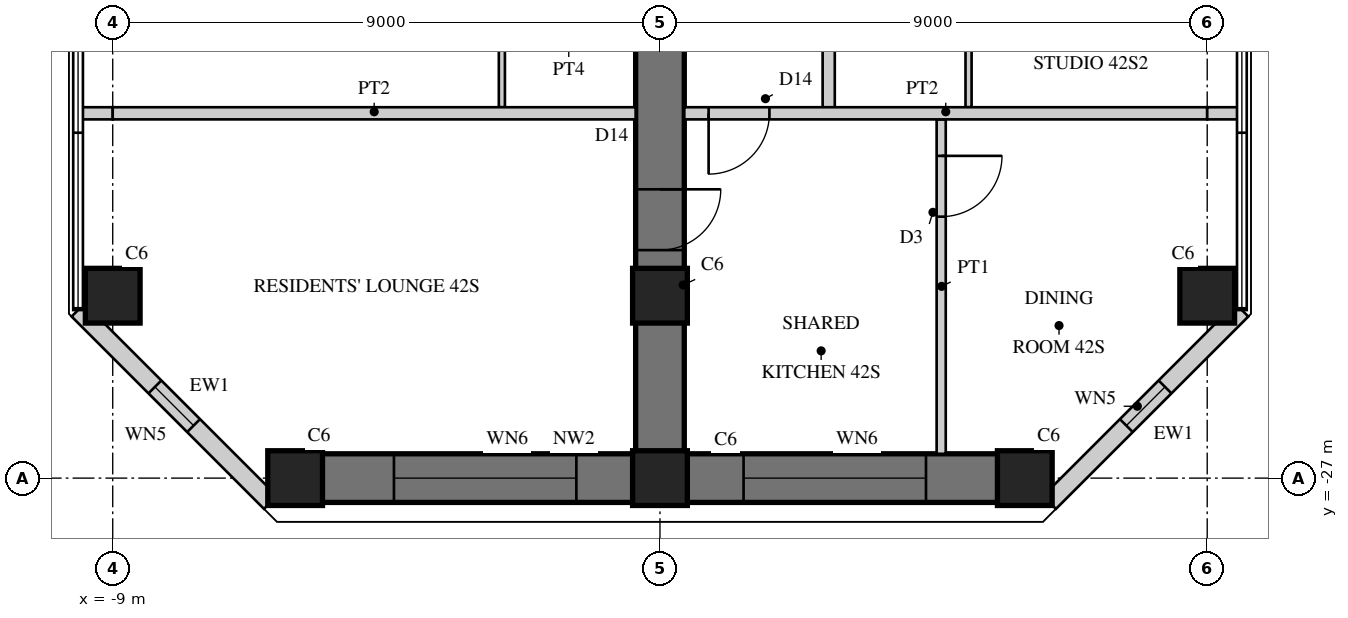
"""IFC4 building model, lengths in metres.
Left out: names, types, materials, properties, quantities, classifications, styles, units other than length and angle.
Written with IfcOpenShell. Run it as: python <this file> out.ifc"""

import sys

from ifc_helpers import new_model, si_unit, direction, frame, frame_2d, origin, origin_2d, place, context, subcontext, project, spatial, rectangle, hollow_rectangle, extrude, element, fill, save


model = new_model("IFC4")
c1 = context("Model", 3, precision=1e-05, world=origin(), true_north=direction((0.0, 1.0)))
c2 = subcontext(c1, "Body", "Model", "MODEL_VIEW")
j1 = project(units=[si_unit("LENGTHUNIT", "METRE"), si_unit("PLANEANGLEUNIT", "RADIAN")], contexts=[c1])
p1 = place(None, origin())
s1 = spatial("IfcSite", under=j1, at=p1, CompositionType="ELEMENT")
p2 = place(p1, origin())
s2 = spatial("IfcBuilding", under=s1, at=p2, CompositionType="ELEMENT")
p3 = place(p2, frame((0.0, 0.0, 172.9)))
s3 = spatial("IfcBuildingStorey", under=s2, at=p3, CompositionType="ELEMENT", Elevation=172.9)
p4 = place(p3, frame((0.0, -9.0, 0.0), z_axis=(0.0, 0.0, 1.0), x_axis=(0.0, -1.0, 0.0)))
e1 = element("IfcWall", 1, at=p4, inside=s3, PredefinedType="SHEAR", context=c2, shape_type="SweptSolid", body=[
    extrude(rectangle(XDim=18.0, YDim=0.8, at=frame_2d((9.0, 0.0))), origin(), (0.0, 0.0, 1.0), 3.4),
])
p5 = place(p4, frame((3.95, 0.0, 0.0)))
e2 = element("IfcOpeningElement", 2, at=p5, cuts=e1, PredefinedType="OPENING", context=c2, shape_type="SweptSolid", body=[
    extrude(rectangle(XDim=1.0, YDim=2.15, at=frame_2d((0.5, 1.075))), frame((0.0, 0.41, 0.0), z_axis=(0.0, -1.0, 0.0), x_axis=(1.0, 0.0, 0.0)), (0.0, 0.0, 1.0), 0.82),
])
p6 = place(p4, frame((6.6, 0.0, 0.0)))
e3 = element("IfcOpeningElement", 3, at=p6, cuts=e1, PredefinedType="OPENING", context=c2, shape_type="SweptSolid", body=[
    extrude(rectangle(XDim=1.0, YDim=2.15, at=frame_2d((0.5, 1.075))), frame((0.0, 0.41, 0.0), z_axis=(0.0, -1.0, 0.0), x_axis=(1.0, 0.0, 0.0)), (0.0, 0.0, 1.0), 0.82),
])
p7 = place(p4, frame((13.25, 0.0, 0.0)))
e4 = element("IfcOpeningElement", 4, at=p7, cuts=e1, PredefinedType="OPENING", context=c2, shape_type="SweptSolid", body=[
    extrude(rectangle(XDim=1.0, YDim=2.2, at=frame_2d((0.5, 1.1))), frame((0.0, 0.41, 0.0), z_axis=(0.0, -1.0, 0.0), x_axis=(1.0, 0.0, 0.0)), (0.0, 0.0, 1.0), 0.82),
])
p8 = place(p3, frame((-6.0, -27.0, 0.0), z_axis=(0.0, 0.0, 1.0), x_axis=(1.0, 0.0, 0.0)))
e5 = element("IfcWall", 5, at=p8, inside=s3, PredefinedType="SHEAR", context=c2, shape_type="SweptSolid", body=[
    extrude(rectangle(XDim=12.0, YDim=0.8, at=frame_2d((6.0, 0.0))), origin(), (0.0, 0.0, 1.0), 3.4),
])
p9 = place(p8, frame((1.625, 0.0, 0.6)))
e6 = element("IfcOpeningElement", 6, at=p9, cuts=e5, PredefinedType="OPENING", context=c2, shape_type="SweptSolid", body=[
    extrude(rectangle(XDim=3.0, YDim=2.4, at=frame_2d((1.5, 1.2))), frame((0.0, 0.41, 0.0), z_axis=(0.0, -1.0, 0.0), x_axis=(1.0, 0.0, 0.0)), (0.0, 0.0, 1.0), 0.82),
])
p10 = place(p8, frame((7.375, 0.0, 0.6)))
e7 = element("IfcOpeningElement", 7, at=p10, cuts=e5, PredefinedType="OPENING", context=c2, shape_type="SweptSolid", body=[
    extrude(rectangle(XDim=3.0, YDim=2.4, at=frame_2d((1.5, 1.2))), frame((0.0, 0.41, 0.0), z_axis=(0.0, -1.0, 0.0), x_axis=(1.0, 0.0, 0.0)), (0.0, 0.0, 1.0), 0.82),
])
for number, where, z_axis, x_axis in (
    (8, (-9.0, -24.0, 0.0), (0.0, 0.0, 1.0), (1.0, 0.0, 0.0)),
    (9, (9.0, -24.0, 0.0), (0.0, 0.0, 1.0), (1.0, 0.0, 0.0)),
    (10, (-6.0, -27.0, 0.0), (0.0, 0.0, 1.0), (1.0, 0.0, 0.0)),
    (11, (0.0, -27.0, 0.0), (0.0, 0.0, 1.0), (1.0, 0.0, 0.0)),
    (12, (6.0, -27.0, 0.0), (0.0, 0.0, 1.0), (1.0, 0.0, 0.0)),
    (13, (0.0, -24.0, 0.0), (0.0, 0.0, 1.0), (1.0, 0.0, 0.0)),
):
    element("IfcColumn", number, at=place(p3, frame(where, z_axis=z_axis, x_axis=x_axis)), inside=s3, PredefinedType="COLUMN", context=c2, shape_type="SweptSolid", body=[
        extrude(rectangle(XDim=0.9, YDim=0.9, at=origin_2d()), origin(), (0.0, 0.0, 1.0), 3.4),
    ])
p11 = place(p3, frame((-9.57, -24.236, 0.0), z_axis=(0.0, 0.0, 1.0), x_axis=(0.707134062067, -0.707079499254, 0.0)))
e14 = element("IfcWall", 14, at=p11, inside=s3, PredefinedType="SOLIDWALL", context=c2, shape_type="SweptSolid", body=[
    extrude(rectangle(XDim=4.475, YDim=0.3, at=frame_2d((2.237, 0.0))), origin(), (0.0, 0.0, 1.0), 3.22),
])
p12 = place(p11, frame((1.787, 0.0, 0.3)))
e15 = element("IfcOpeningElement", 15, at=p12, cuts=e14, PredefinedType="OPENING", context=c2, shape_type="SweptSolid", body=[
    extrude(rectangle(XDim=0.9, YDim=2.4, at=frame_2d((0.45, 1.2))), frame((0.0, 0.16, 0.0), z_axis=(0.0, -1.0, 0.0), x_axis=(1.0, 0.0, 0.0)), (0.0, 0.0, 1.0), 0.32),
])
p13 = place(p3, frame((6.406, -27.4, 0.0), z_axis=(0.0, 0.0, 1.0), x_axis=(0.707134062067, 0.707079499254, 0.0)))
e16 = element("IfcWall", 16, at=p13, inside=s3, PredefinedType="SOLIDWALL", context=c2, shape_type="SweptSolid", body=[
    extrude(rectangle(XDim=4.475, YDim=0.3, at=frame_2d((2.237, 0.0))), origin(), (0.0, 0.0, 1.0), 3.22),
])
p14 = place(p13, frame((1.787, 0.0, 0.3)))
e17 = element("IfcOpeningElement", 17, at=p14, cuts=e16, PredefinedType="OPENING", context=c2, shape_type="SweptSolid", body=[
    extrude(rectangle(XDim=0.9, YDim=2.4, at=frame_2d((0.45, 1.2))), frame((0.0, 0.16, 0.0), z_axis=(0.0, -1.0, 0.0), x_axis=(1.0, 0.0, 0.0)), (0.0, 0.0, 1.0), 0.32),
])
for number, where, z_axis, x_axis in (
    (18, (5.075, -18.45, 0.0), (0.0, 0.0, 1.0), (0.0, -1.0, 0.0)),
    (19, (-2.6, -18.45, 0.0), (0.0, 0.0, 1.0), (0.0, -1.0, 0.0)),
):
    element("IfcWall", number, at=place(p3, frame(where, z_axis=z_axis, x_axis=x_axis)), inside=s3, PredefinedType="PARTITIONING", context=c2, shape_type="SweptSolid", body=[
        extrude(rectangle(XDim=2.45, YDim=0.1, at=frame_2d((1.225, 0.0))), origin(), (0.0, 0.0, 1.0), 3.22),
    ])
p15 = place(p3, frame((2.775, -9.55, 0.0), z_axis=(0.0, 0.0, 1.0), x_axis=(0.0, -1.0, 0.0)))
e20 = element("IfcWall", 20, at=p15, inside=s3, PredefinedType="SOLIDWALL", context=c2, shape_type="SweptSolid", body=[
    extrude(rectangle(XDim=11.45, YDim=0.2, at=frame_2d((5.725, 0.0))), origin(), (0.0, 0.0, 1.0), 3.22),
])
p16 = place(p15, frame((3.4, 0.0, 0.0)))
e21 = element("IfcOpeningElement", 21, at=p16, cuts=e20, PredefinedType="OPENING", context=c2, shape_type="SweptSolid", body=[
    extrude(rectangle(XDim=1.0, YDim=2.15, at=frame_2d((0.5, 1.075))), frame((0.0, 0.11, 0.0), z_axis=(0.0, -1.0, 0.0), x_axis=(1.0, 0.0, 0.0)), (0.0, 0.0, 1.0), 0.22),
])
p17 = place(p15, frame((6.05, 0.0, 0.0)))
e22 = element("IfcOpeningElement", 22, at=p17, cuts=e20, PredefinedType="OPENING", context=c2, shape_type="SweptSolid", body=[
    extrude(rectangle(XDim=1.0, YDim=2.15, at=frame_2d((0.5, 1.075))), frame((0.0, 0.11, 0.0), z_axis=(0.0, -1.0, 0.0), x_axis=(1.0, 0.0, 0.0)), (0.0, 0.0, 1.0), 0.22),
])
p18 = place(p3, frame((4.625, -21.1, 0.0), z_axis=(0.0, 0.0, 1.0), x_axis=(0.0, -1.0, 0.0)))
e23 = element("IfcWall", 23, at=p18, inside=s3, PredefinedType="PARTITIONING", context=c2, shape_type="SweptSolid", body=[
    extrude(rectangle(XDim=5.5, YDim=0.15, at=frame_2d((2.75, 0.0))), origin(), (0.0, 0.0, 1.0), 3.22),
])
p19 = place(p18, frame((0.6, 0.0, 0.0)))
e24 = element("IfcOpeningElement", 24, at=p19, cuts=e23, PredefinedType="OPENING", context=c2, shape_type="SweptSolid", body=[
    extrude(rectangle(XDim=1.0, YDim=2.1, at=frame_2d((0.5, 1.05))), frame((0.0, 0.085, 0.0), z_axis=(0.0, -1.0, 0.0), x_axis=(1.0, 0.0, 0.0)), (0.0, 0.0, 1.0), 0.17),
])
p20 = place(p3, frame((-9.53, -21.0, 0.0), z_axis=(0.0, 0.0, 1.0), x_axis=(1.0, 0.0, 0.0)))
e25 = element("IfcWall", 25, at=p20, inside=s3, PredefinedType="SOLIDWALL", context=c2, shape_type="SweptSolid", body=[
    extrude(rectangle(XDim=0.53, YDim=0.2, at=frame_2d((0.265, 0.0))), origin(), (0.0, 0.0, 1.0), 3.22),
])
p21 = place(p3, frame((-9.0, -21.0, 0.0), z_axis=(0.0, 0.0, 1.0), x_axis=(1.0, 0.0, 0.0)))
e26 = element("IfcWall", 26, at=p21, inside=s3, PredefinedType="SOLIDWALL", context=c2, shape_type="SweptSolid", body=[
    extrude(rectangle(XDim=8.6, YDim=0.2, at=frame_2d((4.3, 0.0))), origin(), (0.0, 0.0, 1.0), 2.62),
])
p22 = place(p3, frame((0.4, -21.0, 0.0), z_axis=(0.0, 0.0, 1.0), x_axis=(1.0, 0.0, 0.0)))
e27 = element("IfcWall", 27, at=p22, inside=s3, PredefinedType="SOLIDWALL", context=c2, shape_type="SweptSolid", body=[
    extrude(rectangle(XDim=8.6, YDim=0.2, at=frame_2d((4.3, 0.0))), origin(), (0.0, 0.0, 1.0), 2.62),
])
p23 = place(p22, frame((0.4, 0.0, 0.0)))
e28 = element("IfcOpeningElement", 28, at=p23, cuts=e27, PredefinedType="OPENING", context=c2, shape_type="SweptSolid", body=[
    extrude(rectangle(XDim=1.0, YDim=2.2, at=frame_2d((0.5, 1.1))), frame((0.0, 0.11, 0.0), z_axis=(0.0, -1.0, 0.0), x_axis=(1.0, 0.0, 0.0)), (0.0, 0.0, 1.0), 0.22),
])
p24 = place(p3, frame((9.0, -21.0, 0.0), z_axis=(0.0, 0.0, 1.0), x_axis=(1.0, 0.0, 0.0)))
e29 = element("IfcWall", 29, at=p24, inside=s3, PredefinedType="SOLIDWALL", context=c2, shape_type="SweptSolid", body=[
    extrude(rectangle(XDim=0.53, YDim=0.2, at=frame_2d((0.265, 0.0))), origin(), (0.0, 0.0, 1.0), 3.22),
])
p25 = place(p12, origin())
e30 = element("IfcWindow", 30, at=p25, inside=s3, PartitioningType="SINGLE_PANEL", PredefinedType="WINDOW", context=c2, shape_type="SweptSolid", body=[
    extrude(hollow_rectangle(XDim=0.9, YDim=2.4, WallThickness=0.06, at=frame_2d((0.45, 1.2))), frame((0.0, 0.03, 0.0), z_axis=(0.0, -1.0, 0.0), x_axis=(1.0, 0.0, 0.0)), (0.0, 0.0, 1.0), 0.06),
    extrude(rectangle(XDim=0.779, YDim=2.279, at=frame_2d((0.45, 1.2))), frame((0.0, 0.03, 0.0), z_axis=(0.0, -1.0, 0.0), x_axis=(1.0, 0.0, 0.0)), (0.0, 0.0, 1.0), 0.06),
])
fill(e15, e30)
p26 = place(p9, origin())
e31 = element("IfcWindow", 31, at=p26, inside=s3, PartitioningType="SINGLE_PANEL", PredefinedType="WINDOW", context=c2, shape_type="SweptSolid", body=[
    extrude(hollow_rectangle(XDim=3.0, YDim=2.4, WallThickness=0.06, at=frame_2d((1.5, 1.2))), frame((0.0, 0.03, 0.0), z_axis=(0.0, -1.0, 0.0), x_axis=(1.0, 0.0, 0.0)), (0.0, 0.0, 1.0), 0.06),
    extrude(rectangle(XDim=2.879, YDim=2.279, at=frame_2d((1.5, 1.2))), frame((0.0, 0.03, 0.0), z_axis=(0.0, -1.0, 0.0), x_axis=(1.0, 0.0, 0.0)), (0.0, 0.0, 1.0), 0.06),
])
fill(e6, e31)
p27 = place(p10, origin())
e32 = element("IfcWindow", 32, at=p27, inside=s3, PartitioningType="SINGLE_PANEL", PredefinedType="WINDOW", context=c2, shape_type="SweptSolid", body=[
    extrude(hollow_rectangle(XDim=3.0, YDim=2.4, WallThickness=0.06, at=frame_2d((1.5, 1.2))), frame((0.0, 0.03, 0.0), z_axis=(0.0, -1.0, 0.0), x_axis=(1.0, 0.0, 0.0)), (0.0, 0.0, 1.0), 0.06),
    extrude(rectangle(XDim=2.879, YDim=2.279, at=frame_2d((1.5, 1.2))), frame((0.0, 0.03, 0.0), z_axis=(0.0, -1.0, 0.0), x_axis=(1.0, 0.0, 0.0)), (0.0, 0.0, 1.0), 0.06),
])
fill(e7, e32)
p28 = place(p14, origin())
e33 = element("IfcWindow", 33, at=p28, inside=s3, PartitioningType="SINGLE_PANEL", PredefinedType="WINDOW", context=c2, shape_type="SweptSolid", body=[
    extrude(hollow_rectangle(XDim=0.9, YDim=2.4, WallThickness=0.06, at=frame_2d((0.45, 1.2))), frame((0.0, 0.03, 0.0), z_axis=(0.0, -1.0, 0.0), x_axis=(1.0, 0.0, 0.0)), (0.0, 0.0, 1.0), 0.06),
    extrude(rectangle(XDim=0.779, YDim=2.279, at=frame_2d((0.45, 1.2))), frame((0.0, 0.03, 0.0), z_axis=(0.0, -1.0, 0.0), x_axis=(1.0, 0.0, 0.0)), (0.0, 0.0, 1.0), 0.06),
])
fill(e17, e33)
p29 = place(p19, origin())
e34 = element("IfcDoor", 34, at=p29, inside=s3, OperationType="SINGLE_SWING_LEFT", PredefinedType="DOOR", context=c2, shape_type="SweptSolid", body=[
    extrude(rectangle(XDim=1.0, YDim=2.1, at=frame_2d((0.5, 1.05))), frame((0.0, 0.025, 0.0), z_axis=(0.0, -1.0, 0.0), x_axis=(1.0, 0.0, 0.0)), (0.0, 0.0, 1.0), 0.05),
])
fill(e24, e34)
p30 = place(p23, frame((1.0, 0.0, 0.0), z_axis=(0.0, 0.0, 1.0), x_axis=(-1.0, 0.0, 0.0)))
e35 = element("IfcDoor", 35, at=p30, inside=s3, OperationType="SINGLE_SWING_RIGHT", PredefinedType="DOOR", context=c2, shape_type="SweptSolid", body=[
    extrude(rectangle(XDim=1.0, YDim=2.2, at=frame_2d((0.5, 1.1))), frame((0.0, 0.025, 0.0), z_axis=(0.0, -1.0, 0.0), x_axis=(1.0, 0.0, 0.0)), (0.0, 0.0, 1.0), 0.05),
])
fill(e28, e35)
p31 = place(p7, origin())
e36 = element("IfcDoor", 36, at=p31, inside=s3, OperationType="SINGLE_SWING_LEFT", PredefinedType="DOOR", context=c2, shape_type="SweptSolid", body=[
    extrude(rectangle(XDim=1.0, YDim=2.2, at=frame_2d((0.5, 1.1))), frame((0.0, 0.025, 0.0), z_axis=(0.0, -1.0, 0.0), x_axis=(1.0, 0.0, 0.0)), (0.0, 0.0, 1.0), 0.05),
])
fill(e4, e36)
save(model, sys.argv[1])
